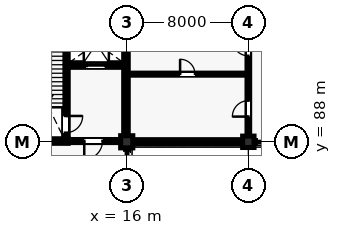
"""IFC4 building model, lengths in metres.
Left out: names, types, materials, properties, quantities, classifications, styles, units other than length and angle.
Written with IfcOpenShell. Run it as: python <this file> out.ifc"""

import sys

from ifc_helpers import new_model, si_unit, direction, frame, frame_2d, origin, origin_2d, place, context, subcontext, project, spatial, rectangle, extrude, element, fill, save


model = new_model("IFC4")
c1 = context("Model", 3, precision=1e-05, world=origin(), true_north=direction((0.0, 1.0)))
c2 = subcontext(c1, "Body", "Model", "MODEL_VIEW")
j1 = project(units=[si_unit("LENGTHUNIT", "METRE"), si_unit("PLANEANGLEUNIT", "RADIAN")], contexts=[c1])
p1 = place(None, origin())
s1 = spatial("IfcSite", under=j1, at=p1, CompositionType="ELEMENT")
p2 = place(p1, origin())
s2 = spatial("IfcBuilding", under=s1, at=p2, CompositionType="ELEMENT")
p3 = place(p2, origin())
s3 = spatial("IfcBuildingStorey", under=s2, at=p3, CompositionType="ELEMENT", Elevation=0.0)
p4 = place(p3, frame((16.0, 88.0, 0.0), z_axis=(0.0, 0.0, 1.0), x_axis=(1.0, 0.0, 0.0)))
e1 = element("IfcColumn", 1, at=p4, inside=s3, PredefinedType="COLUMN", context=c2, shape_type="SweptSolid", body=[
    extrude(rectangle(XDim=0.8, YDim=0.8, at=origin_2d()), origin(), (0.0, 0.0, 1.0), 5.28),
])
p5 = place(p3, frame((24.0, 88.0, 0.0), z_axis=(0.0, 0.0, 1.0), x_axis=(1.0, 0.0, 0.0)))
e2 = element("IfcColumn", 2, at=p5, inside=s3, PredefinedType="COLUMN", context=c2, shape_type="SweptSolid", body=[
    extrude(rectangle(XDim=0.75, YDim=0.75, at=origin_2d()), origin(), (0.0, 0.0, 1.0), 5.28),
])
p6 = place(p3, frame((16.385, 88.0, 0.0), z_axis=(0.0, 0.0, 1.0), x_axis=(1.0, 0.0, 0.0)))
e3 = element("IfcWall", 3, at=p6, inside=s3, PredefinedType="SOLIDWALL", context=c2, shape_type="SweptSolid", body=[
    extrude(rectangle(XDim=7.255, YDim=0.28, at=frame_2d((3.627, 0.0))), origin(), (0.0, 0.0, 1.0), 4.674),
])
p7 = place(p6, frame((2.552, 0.0, 0.9)))
e4 = element("IfcOpeningElement", 4, at=p7, cuts=e3, PredefinedType="OPENING", context=c2, shape_type="SweptSolid", body=[
    extrude(rectangle(XDim=2.15, YDim=2.8, at=frame_2d((1.075, 1.4))), frame((0.0, 0.15, 0.0), z_axis=(0.0, -1.0, 0.0), x_axis=(1.0, 0.0, 0.0)), (0.0, 0.0, 1.0), 0.3),
])
p8 = place(p3, frame((15.95, 88.29, 0.0), z_axis=(0.0, 0.0, 1.0), x_axis=(0.0, 1.0, 0.0)))
e5 = element("IfcWall", 5, at=p8, inside=s3, PredefinedType="SHEAR", context=c2, shape_type="SweptSolid", body=[
    extrude(rectangle(XDim=7.42, YDim=0.3, at=frame_2d((3.71, 0.0))), origin(), (0.0, 0.0, 1.0), 5.035),
])
p9 = place(p3, frame((8.29, 88.05, 0.0), z_axis=(0.0, 0.0, 1.0), x_axis=(1.0, 0.0, 0.0)))
e6 = element("IfcWall", 6, at=p9, inside=s3, PredefinedType="SHEAR", context=c2, shape_type="SweptSolid", body=[
    extrude(rectangle(XDim=3.86, YDim=0.3, at=frame_2d((1.93, 0.0))), origin(), (0.0, 0.0, 1.0), 5.035),
])
p10 = place(p3, frame((12.0, 88.05, 0.0), z_axis=(0.0, 0.0, 1.0), x_axis=(0.0, 1.0, 0.0)))
e7 = element("IfcWall", 7, at=p10, inside=s3, PredefinedType="SHEAR", context=c2, shape_type="SweptSolid", body=[
    extrude(rectangle(XDim=7.9, YDim=0.3, at=frame_2d((3.95, 0.0))), origin(), (0.0, 0.0, 1.0), 5.035),
])
p11 = place(p10, frame((0.55, 0.0, 0.0)))
e8 = element("IfcOpeningElement", 8, at=p11, cuts=e7, PredefinedType="OPENING", context=c2, shape_type="SweptSolid", body=[
    extrude(rectangle(XDim=1.1, YDim=2.15, at=frame_2d((0.55, 1.075))), frame((0.0, 0.16, 0.0), z_axis=(0.0, -1.0, 0.0), x_axis=(1.0, 0.0, 0.0)), (0.0, 0.0, 1.0), 0.32),
])
p12 = place(p3, frame((12.0, 93.05, 0.0), z_axis=(0.0, 0.0, 1.0), x_axis=(1.0, 0.0, 0.0)))
e9 = element("IfcWall", 9, at=p12, inside=s3, PredefinedType="SHEAR", context=c2, shape_type="SweptSolid", body=[
    extrude(rectangle(XDim=3.95, YDim=0.3, at=frame_2d((1.975, 0.0))), origin(), (0.0, 0.0, 1.0), 5.035),
])
p13 = place(p12, frame((1.375, 0.0, 0.0)))
e10 = element("IfcOpeningElement", 10, at=p13, cuts=e9, PredefinedType="OPENING", context=c2, shape_type="SweptSolid", body=[
    extrude(rectangle(XDim=1.2, YDim=2.2, at=frame_2d((0.6, 1.1))), frame((0.0, 0.16, 0.0), z_axis=(0.0, -1.0, 0.0), x_axis=(1.0, 0.0, 0.0)), (0.0, 0.0, 1.0), 0.32),
])
p14 = place(p3, frame((12.0, 88.05, 0.0), z_axis=(0.0, 0.0, 1.0), x_axis=(1.0, 0.0, 0.0)))
e11 = element("IfcWall", 11, at=p14, inside=s3, PredefinedType="PARTITIONING", context=c2, shape_type="SweptSolid", body=[
    extrude(rectangle(XDim=3.61, YDim=0.2, at=frame_2d((1.805, 0.0))), origin(), (0.0, 0.0, 1.0), 4.327),
])
p15 = place(p14, frame((1.205, 0.0, 0.0)))
e12 = element("IfcOpeningElement", 12, at=p15, cuts=e11, PredefinedType="OPENING", context=c2, shape_type="SweptSolid", body=[
    extrude(rectangle(XDim=1.2, YDim=2.15, at=frame_2d((0.6, 1.075))), frame((0.0, 0.11, 0.0), z_axis=(0.0, -1.0, 0.0), x_axis=(1.0, 0.0, 0.0)), (0.0, 0.0, 1.0), 0.22),
])
p16 = place(p3, frame((24.0, 88.365, 0.0), z_axis=(0.0, 0.0, 1.0), x_axis=(0.0, 1.0, 0.0)))
e13 = element("IfcWall", 13, at=p16, inside=s3, PredefinedType="PARTITIONING", context=c2, shape_type="SweptSolid", body=[
    extrude(rectangle(XDim=7.27, YDim=0.175, at=frame_2d((3.635, 0.0))), origin(), (0.0, 0.0, 1.0), 4.404),
])
p17 = place(p16, frame((1.292, 0.0, 0.0)))
e14 = element("IfcOpeningElement", 14, at=p17, cuts=e13, PredefinedType="OPENING", context=c2, shape_type="SweptSolid", body=[
    extrude(rectangle(XDim=1.05, YDim=2.15, at=frame_2d((0.525, 1.075))), frame((0.0, 0.097, 0.0), z_axis=(0.0, -1.0, 0.0), x_axis=(1.0, 0.0, 0.0)), (0.0, 0.0, 1.0), 0.195),
])
p18 = place(p16, frame((5.291, 0.0, 0.0)))
e15 = element("IfcOpeningElement", 15, at=p18, cuts=e13, PredefinedType="OPENING", context=c2, shape_type="SweptSolid", body=[
    extrude(rectangle(XDim=1.05, YDim=2.15, at=frame_2d((0.525, 1.075))), frame((0.0, 0.097, 0.0), z_axis=(0.0, -1.0, 0.0), x_axis=(1.0, 0.0, 0.0)), (0.0, 0.0, 1.0), 0.195),
])
p19 = place(p3, frame((16.02, 92.45, 0.0), z_axis=(0.0, 0.0, 1.0), x_axis=(1.0, 0.0, 0.0)))
e16 = element("IfcWall", 16, at=p19, inside=s3, PredefinedType="PARTITIONING", context=c2, shape_type="SweptSolid", body=[
    extrude(rectangle(XDim=7.96, YDim=0.135, at=frame_2d((3.98, 0.0))), origin(), (0.0, 0.0, 1.0), 4.404),
])
p20 = place(p19, frame((3.49, 0.0, 0.0)))
e17 = element("IfcOpeningElement", 17, at=p20, cuts=e16, PredefinedType="OPENING", context=c2, shape_type="SweptSolid", body=[
    extrude(rectangle(XDim=0.98, YDim=2.15, at=frame_2d((0.49, 1.075))), frame((0.0, 0.077, 0.0), z_axis=(0.0, -1.0, 0.0), x_axis=(1.0, 0.0, 0.0)), (0.0, 0.0, 1.0), 0.155),
])
p21 = place(p7, origin())
e18 = element("IfcWindow", 18, at=p21, inside=s3, PartitioningType="SINGLE_PANEL", PredefinedType="WINDOW", context=c2, shape_type="SweptSolid", body=[
    extrude(rectangle(XDim=2.15, YDim=2.8, at=frame_2d((1.075, 1.4))), frame((0.0, 0.03, 0.0), z_axis=(0.0, -1.0, 0.0), x_axis=(1.0, 0.0, 0.0)), (0.0, 0.0, 1.0), 0.06),
])
fill(e4, e18)
p22 = place(p11, frame((1.1, 0.0, 0.0), z_axis=(0.0, 0.0, 1.0), x_axis=(-1.0, 0.0, 0.0)))
e19 = element("IfcDoor", 19, at=p22, inside=s3, OperationType="SINGLE_SWING_RIGHT", PredefinedType="DOOR", context=c2, shape_type="SweptSolid", body=[
    extrude(rectangle(XDim=1.1, YDim=2.15, at=frame_2d((0.55, 1.075))), frame((0.0, 0.025, 0.0), z_axis=(0.0, -1.0, 0.0), x_axis=(1.0, 0.0, 0.0)), (0.0, 0.0, 1.0), 0.05),
])
fill(e8, e19)
p23 = place(p13, origin())
e20 = element("IfcDoor", 20, at=p23, inside=s3, OperationType="SLIDING_TO_LEFT", PredefinedType="DOOR", context=c2, shape_type="SweptSolid", body=[
    extrude(rectangle(XDim=1.2, YDim=2.2, at=frame_2d((0.6, 1.1))), frame((0.0, 0.025, 0.0), z_axis=(0.0, -1.0, 0.0), x_axis=(1.0, 0.0, 0.0)), (0.0, 0.0, 1.0), 0.05),
])
fill(e10, e20)
p24 = place(p15, frame((1.2, 0.0, 0.0), z_axis=(0.0, 0.0, 1.0), x_axis=(-1.0, 0.0, 0.0)))
e21 = element("IfcDoor", 21, at=p24, inside=s3, OperationType="SINGLE_SWING_LEFT", PredefinedType="DOOR", context=c2, shape_type="SweptSolid", body=[
    extrude(rectangle(XDim=1.2, YDim=2.15, at=frame_2d((0.6, 1.075))), frame((0.0, 0.025, 0.0), z_axis=(0.0, -1.0, 0.0), x_axis=(1.0, 0.0, 0.0)), (0.0, 0.0, 1.0), 0.05),
])
fill(e12, e21)
p25 = place(p17, origin())
e22 = element("IfcDoor", 22, at=p25, inside=s3, OperationType="SINGLE_SWING_LEFT", PredefinedType="DOOR", context=c2, shape_type="SweptSolid", body=[
    extrude(rectangle(XDim=1.05, YDim=2.15, at=frame_2d((0.525, 1.075))), frame((0.0, 0.025, 0.0), z_axis=(0.0, -1.0, 0.0), x_axis=(1.0, 0.0, 0.0)), (0.0, 0.0, 1.0), 0.05),
])
fill(e14, e22)
p26 = place(p18, origin())
e23 = element("IfcDoor", 23, at=p26, inside=s3, OperationType="SINGLE_SWING_RIGHT", PredefinedType="DOOR", context=c2, shape_type="SweptSolid", body=[
    extrude(rectangle(XDim=1.05, YDim=2.15, at=frame_2d((0.525, 1.075))), frame((0.0, 0.025, 0.0), z_axis=(0.0, -1.0, 0.0), x_axis=(1.0, 0.0, 0.0)), (0.0, 0.0, 1.0), 0.05),
])
fill(e15, e23)
p27 = place(p20, origin())
e24 = element("IfcDoor", 24, at=p27, inside=s3, OperationType="SINGLE_SWING_LEFT", PredefinedType="DOOR", context=c2, shape_type="SweptSolid", body=[
    extrude(rectangle(XDim=0.98, YDim=2.15, at=frame_2d((0.49, 1.075))), frame((0.0, 0.025, 0.0), z_axis=(0.0, -1.0, 0.0), x_axis=(1.0, 0.0, 0.0)), (0.0, 0.0, 1.0), 0.05),
])
fill(e17, e24)
save(model, sys.argv[1])
